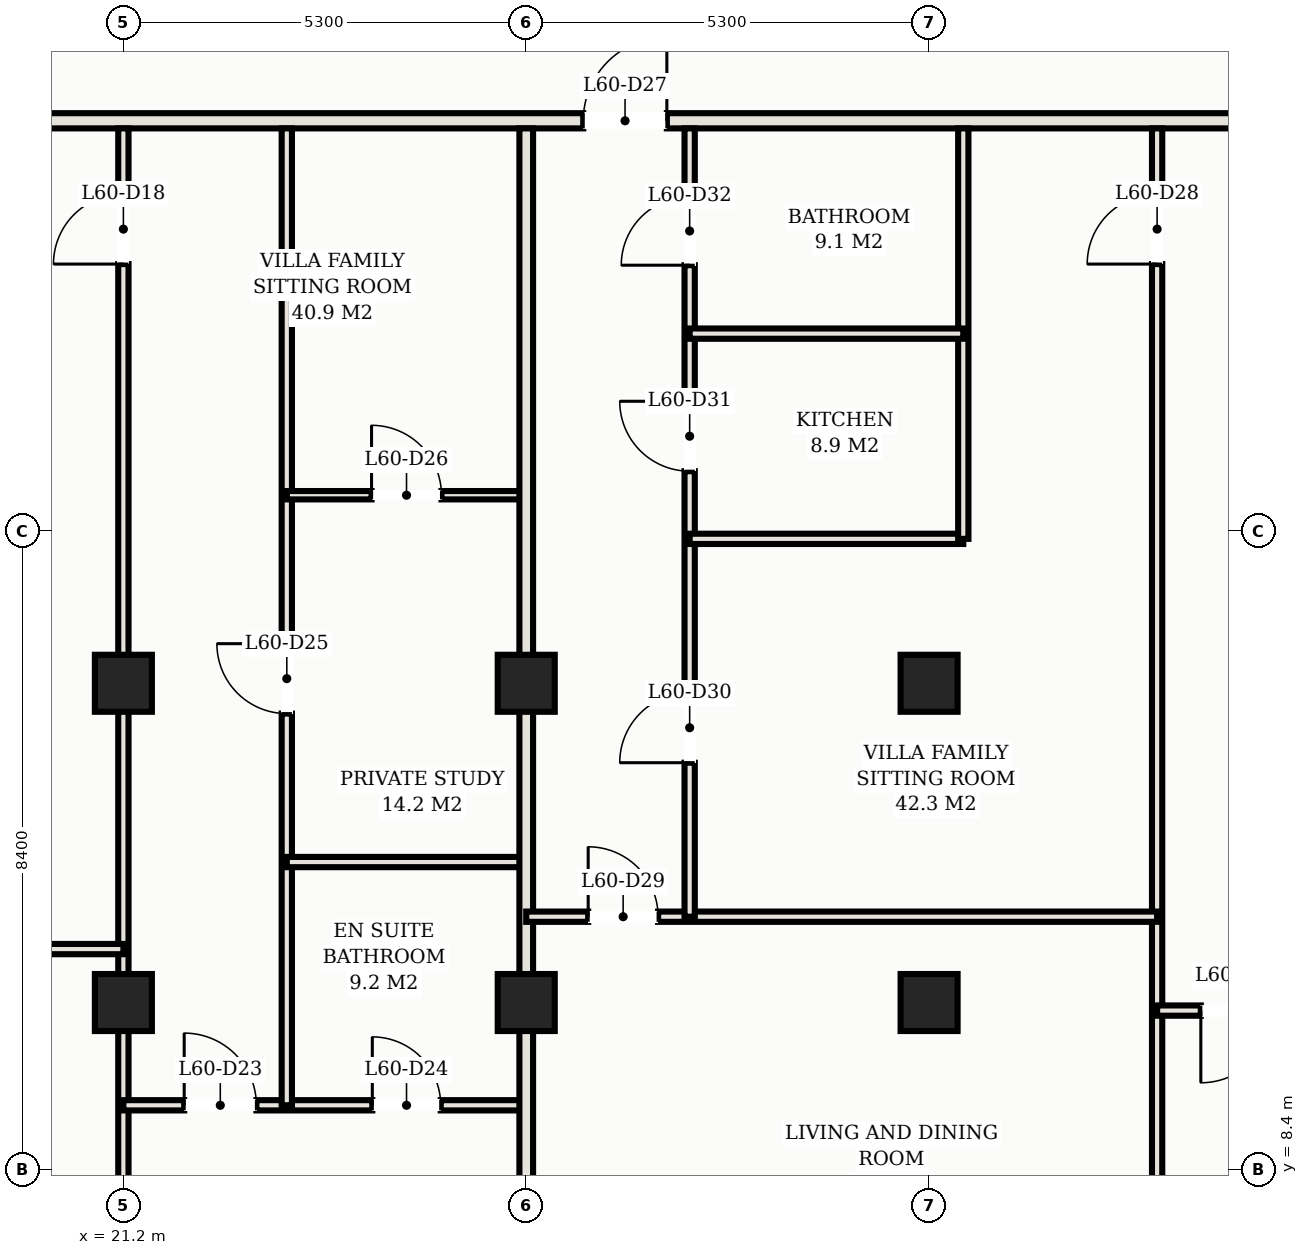
"""IFC4 building model, lengths in metres.
Left out: names, types, materials, properties, quantities, classifications, styles, units other than length and angle.
Written with IfcOpenShell. Run it as: python <this file> out.ifc"""

import sys

from ifc_helpers import new_model, si_unit, direction, frame, frame_2d, origin, origin_2d, place, context, subcontext, project, spatial, rectangle, hollow_rectangle, extrude, element, fill, save


model = new_model("IFC4")
c1 = context("Model", 3, precision=1e-05, world=origin(), true_north=direction((0.0, 1.0)))
c2 = subcontext(c1, "Body", "Model", "MODEL_VIEW")
j1 = project(units=[si_unit("LENGTHUNIT", "METRE"), si_unit("PLANEANGLEUNIT", "RADIAN")], contexts=[c1])
p1 = place(None, origin())
s1 = spatial("IfcSite", under=j1, at=p1, CompositionType="ELEMENT")
p2 = place(p1, origin())
s2 = spatial("IfcBuilding", under=s1, at=p2, CompositionType="ELEMENT")
p3 = place(p2, frame((0.0, 0.0, 219.8)))
s3 = spatial("IfcBuildingStorey", under=s2, at=p3, CompositionType="ELEMENT", Elevation=219.8)
for number, where, z_axis, x_axis in (
    (1, (21.2, 14.8, 0.0), (0.0, 0.0, 1.0), (1.0, 0.0, 0.0)),
    (2, (21.2, 10.6, 0.0), (0.0, 0.0, 1.0), (1.0, 0.0, 0.0)),
    (3, (26.5, 14.8, 0.0), (0.0, 0.0, 1.0), (1.0, 0.0, 0.0)),
    (4, (26.5, 10.6, 0.0), (0.0, 0.0, 1.0), (1.0, 0.0, 0.0)),
    (5, (31.8, 14.8, 0.0), (0.0, 0.0, 1.0), (1.0, 0.0, 0.0)),
    (6, (31.8, 10.6, 0.0), (0.0, 0.0, 1.0), (1.0, 0.0, 0.0)),
):
    element("IfcColumn", number, at=place(p3, frame(where, z_axis=z_axis, x_axis=x_axis)), inside=s3, PredefinedType="COLUMN", context=c2, shape_type="SweptSolid", body=[
        extrude(hollow_rectangle(XDim=0.75, YDim=0.75, WallThickness=0.025, at=origin_2d()), origin(), (0.0, 0.0, 1.0), 3.3),
    ])
p4 = place(p3, frame((6.72, 22.2, 0.0), z_axis=(0.0, 0.0, 1.0), x_axis=(1.0, 0.0, 0.0)))
e7 = element("IfcWall", 7, at=p4, inside=s3, PredefinedType="PARTITIONING", context=c2, shape_type="SweptSolid", body=[
    extrude(rectangle(XDim=39.56, YDim=0.2, at=frame_2d((19.78, 0.0))), origin(), (0.0, 0.0, 1.0), 2.43),
])
p5 = place(p4, frame((4.63, 0.0, 0.0)))
e8 = element("IfcOpeningElement", 8, at=p5, cuts=e7, PredefinedType="OPENING", context=c2, shape_type="SweptSolid", body=[
    extrude(rectangle(XDim=1.1, YDim=2.25, at=frame_2d((0.55, 1.125))), frame((0.0, 0.11, 0.0), z_axis=(0.0, -1.0, 0.0), x_axis=(1.0, 0.0, 0.0)), (0.0, 0.0, 1.0), 0.22),
])
p6 = place(p4, frame((20.53, 0.0, 0.0)))
e9 = element("IfcOpeningElement", 9, at=p6, cuts=e7, PredefinedType="OPENING", context=c2, shape_type="SweptSolid", body=[
    extrude(rectangle(XDim=1.1, YDim=2.25, at=frame_2d((0.55, 1.125))), frame((0.0, 0.11, 0.0), z_axis=(0.0, -1.0, 0.0), x_axis=(1.0, 0.0, 0.0)), (0.0, 0.0, 1.0), 0.22),
])
p7 = place(p4, frame((1.435, 0.0, 0.0)))
e10 = element("IfcOpeningElement", 10, at=p7, cuts=e7, PredefinedType="OPENING", context=c2, shape_type="SweptSolid", body=[
    extrude(rectangle(XDim=0.92, YDim=2.15, at=frame_2d((0.46, 1.075))), frame((0.0, 0.11, 0.0), z_axis=(0.0, -1.0, 0.0), x_axis=(1.0, 0.0, 0.0)), (0.0, 0.0, 1.0), 0.22),
])
p8 = place(p4, frame((37.205, 0.0, 0.0)))
e11 = element("IfcOpeningElement", 11, at=p8, cuts=e7, PredefinedType="OPENING", context=c2, shape_type="SweptSolid", body=[
    extrude(rectangle(XDim=0.92, YDim=2.15, at=frame_2d((0.46, 1.075))), frame((0.0, 0.11, 0.0), z_axis=(0.0, -1.0, 0.0), x_axis=(1.0, 0.0, 0.0)), (0.0, 0.0, 1.0), 0.22),
])
p9 = place(p3, frame((21.2, 5.331, 0.0), z_axis=(0.0, 0.0, 1.0), x_axis=(0.0, 1.0, 0.0)))
e12 = element("IfcWall", 12, at=p9, inside=s3, PredefinedType="PARTITIONING", context=c2, shape_type="SweptSolid", body=[
    extrude(rectangle(XDim=16.769, YDim=0.135, at=frame_2d((8.385, 0.0))), origin(), (0.0, 0.0, 1.0), 2.43),
])
p10 = place(p9, frame((14.984, 0.0, 0.0)))
e13 = element("IfcOpeningElement", 13, at=p10, cuts=e12, PredefinedType="OPENING", context=c2, shape_type="SweptSolid", body=[
    extrude(rectangle(XDim=0.92, YDim=2.15, at=frame_2d((0.46, 1.075))), frame((0.0, 0.078, 0.0), z_axis=(0.0, -1.0, 0.0), x_axis=(1.0, 0.0, 0.0)), (0.0, 0.0, 1.0), 0.155),
])
p11 = place(p3, frame((10.6, 11.303, 0.0), z_axis=(0.0, 0.0, 1.0), x_axis=(1.0, 0.0, 0.0)))
e14 = element("IfcWall", 14, at=p11, inside=s3, PredefinedType="PARTITIONING", context=c2, shape_type="SweptSolid", body=[
    extrude(rectangle(XDim=10.6, YDim=0.135, at=frame_2d((5.3, 0.0))), origin(), (0.0, 0.0, 1.0), 2.43),
])
p12 = place(p11, frame((0.815, 0.0, 0.0)))
e15 = element("IfcOpeningElement", 15, at=p12, cuts=e14, PredefinedType="OPENING", context=c2, shape_type="SweptSolid", body=[
    extrude(rectangle(XDim=0.92, YDim=2.15, at=frame_2d((0.46, 1.075))), frame((0.0, 0.078, 0.0), z_axis=(0.0, -1.0, 0.0), x_axis=(1.0, 0.0, 0.0)), (0.0, 0.0, 1.0), 0.155),
])
p13 = place(p3, frame((21.2, 9.248, 0.0), z_axis=(0.0, 0.0, 1.0), x_axis=(1.0, 0.0, 0.0)))
e16 = element("IfcWall", 16, at=p13, inside=s3, PredefinedType="PARTITIONING", context=c2, shape_type="SweptSolid", body=[
    extrude(rectangle(XDim=5.3, YDim=0.135, at=frame_2d((2.65, 0.0))), origin(), (0.0, 0.0, 1.0), 2.43),
])
p14 = place(p13, frame((0.8, 0.0, 0.0)))
e17 = element("IfcOpeningElement", 17, at=p14, cuts=e16, PredefinedType="OPENING", context=c2, shape_type="SweptSolid", body=[
    extrude(rectangle(XDim=0.95, YDim=2.15, at=frame_2d((0.475, 1.075))), frame((0.0, 0.078, 0.0), z_axis=(0.0, -1.0, 0.0), x_axis=(1.0, 0.0, 0.0)), (0.0, 0.0, 1.0), 0.155),
])
p15 = place(p13, frame((3.275, 0.0, 0.0)))
e18 = element("IfcOpeningElement", 18, at=p15, cuts=e16, PredefinedType="OPENING", context=c2, shape_type="SweptSolid", body=[
    extrude(rectangle(XDim=0.9, YDim=2.15, at=frame_2d((0.45, 1.075))), frame((0.0, 0.078, 0.0), z_axis=(0.0, -1.0, 0.0), x_axis=(1.0, 0.0, 0.0)), (0.0, 0.0, 1.0), 0.155),
])
p16 = place(p3, frame((23.35, 9.248, 0.0), z_axis=(0.0, 0.0, 1.0), x_axis=(0.0, 1.0, 0.0)))
e19 = element("IfcWall", 19, at=p16, inside=s3, PredefinedType="PARTITIONING", context=c2, shape_type="SweptSolid", body=[
    extrude(rectangle(XDim=12.852, YDim=0.135, at=frame_2d((6.426, 0.0))), origin(), (0.0, 0.0, 1.0), 2.43),
])
p17 = place(p16, frame((5.153, 0.0, 0.0)))
e20 = element("IfcOpeningElement", 20, at=p17, cuts=e19, PredefinedType="OPENING", context=c2, shape_type="SweptSolid", body=[
    extrude(rectangle(XDim=0.92, YDim=2.15, at=frame_2d((0.46, 1.075))), frame((0.0, 0.078, 0.0), z_axis=(0.0, -1.0, 0.0), x_axis=(1.0, 0.0, 0.0)), (0.0, 0.0, 1.0), 0.155),
])
p18 = place(p3, frame((23.35, 12.448, 0.0), z_axis=(0.0, 0.0, 1.0), x_axis=(1.0, 0.0, 0.0)))
e21 = element("IfcWall", 21, at=p18, inside=s3, PredefinedType="PARTITIONING", context=c2, shape_type="SweptSolid", body=[
    extrude(rectangle(XDim=3.15, YDim=0.135, at=frame_2d((1.575, 0.0))), origin(), (0.0, 0.0, 1.0), 2.43),
])
p19 = place(p3, frame((23.35, 17.274, 0.0), z_axis=(0.0, 0.0, 1.0), x_axis=(1.0, 0.0, 0.0)))
e22 = element("IfcWall", 22, at=p19, inside=s3, PredefinedType="MOVABLE", context=c2, shape_type="SweptSolid", body=[
    extrude(rectangle(XDim=3.15, YDim=0.11, at=frame_2d((1.575, 0.0))), origin(), (0.0, 0.0, 1.0), 2.43),
])
p20 = place(p19, frame((1.115, 0.0, 0.0)))
e23 = element("IfcOpeningElement", 23, at=p20, cuts=e22, PredefinedType="OPENING", context=c2, shape_type="SweptSolid", body=[
    extrude(rectangle(XDim=0.92, YDim=2.15, at=frame_2d((0.46, 1.075))), frame((0.0, 0.065, 0.0), z_axis=(0.0, -1.0, 0.0), x_axis=(1.0, 0.0, 0.0)), (0.0, 0.0, 1.0), 0.13),
])
p21 = place(p3, frame((26.5, 4.42, 0.0), z_axis=(0.0, 0.0, 1.0), x_axis=(0.0, 1.0, 0.0)))
e24 = element("IfcWall", 24, at=p21, inside=s3, PredefinedType="PARTITIONING", context=c2, shape_type="SweptSolid", body=[
    extrude(rectangle(XDim=17.68, YDim=0.18, at=frame_2d((8.84, 0.0))), origin(), (0.0, 0.0, 1.0), 2.43),
])
p22 = place(p3, frame((34.8, 6.02, 0.0), z_axis=(0.0, 0.0, 1.0), x_axis=(0.0, 1.0, 0.0)))
e25 = element("IfcWall", 25, at=p22, inside=s3, PredefinedType="PARTITIONING", context=c2, shape_type="SweptSolid", body=[
    extrude(rectangle(XDim=16.08, YDim=0.135, at=frame_2d((8.04, 0.0))), origin(), (0.0, 0.0, 1.0), 2.43),
])
p23 = place(p22, frame((14.295, 0.0, 0.0)))
e26 = element("IfcOpeningElement", 26, at=p23, cuts=e25, PredefinedType="OPENING", context=c2, shape_type="SweptSolid", body=[
    extrude(rectangle(XDim=0.92, YDim=2.15, at=frame_2d((0.46, 1.075))), frame((0.0, 0.078, 0.0), z_axis=(0.0, -1.0, 0.0), x_axis=(1.0, 0.0, 0.0)), (0.0, 0.0, 1.0), 0.155),
])
p24 = place(p3, frame((26.5, 11.729, 0.0), z_axis=(0.0, 0.0, 1.0), x_axis=(1.0, 0.0, 0.0)))
e27 = element("IfcWall", 27, at=p24, inside=s3, PredefinedType="PARTITIONING", context=c2, shape_type="SweptSolid", body=[
    extrude(rectangle(XDim=8.3, YDim=0.135, at=frame_2d((4.15, 0.0))), origin(), (0.0, 0.0, 1.0), 2.43),
])
p25 = place(p24, frame((0.815, 0.0, 0.0)))
e28 = element("IfcOpeningElement", 28, at=p25, cuts=e27, PredefinedType="OPENING", context=c2, shape_type="SweptSolid", body=[
    extrude(rectangle(XDim=0.92, YDim=2.15, at=frame_2d((0.46, 1.075))), frame((0.0, 0.078, 0.0), z_axis=(0.0, -1.0, 0.0), x_axis=(1.0, 0.0, 0.0)), (0.0, 0.0, 1.0), 0.155),
])
p26 = place(p3, frame((28.65, 11.729, 0.0), z_axis=(0.0, 0.0, 1.0), x_axis=(0.0, 1.0, 0.0)))
e29 = element("IfcWall", 29, at=p26, inside=s3, PredefinedType="PARTITIONING", context=c2, shape_type="SweptSolid", body=[
    extrude(rectangle(XDim=10.371, YDim=0.135, at=frame_2d((5.186, 0.0))), origin(), (0.0, 0.0, 1.0), 2.43),
])
p27 = place(p26, frame((2.026, 0.0, 0.0)))
e30 = element("IfcOpeningElement", 30, at=p27, cuts=e29, PredefinedType="OPENING", context=c2, shape_type="SweptSolid", body=[
    extrude(rectangle(XDim=0.92, YDim=2.15, at=frame_2d((0.46, 1.075))), frame((0.0, 0.078, 0.0), z_axis=(0.0, -1.0, 0.0), x_axis=(1.0, 0.0, 0.0)), (0.0, 0.0, 1.0), 0.155),
])
p28 = place(p26, frame((5.861, 0.0, 0.0)))
e31 = element("IfcOpeningElement", 31, at=p28, cuts=e29, PredefinedType="OPENING", context=c2, shape_type="SweptSolid", body=[
    extrude(rectangle(XDim=0.92, YDim=2.15, at=frame_2d((0.46, 1.075))), frame((0.0, 0.078, 0.0), z_axis=(0.0, -1.0, 0.0), x_axis=(1.0, 0.0, 0.0)), (0.0, 0.0, 1.0), 0.155),
])
p29 = place(p26, frame((8.571, 0.0, 0.0)))
e32 = element("IfcOpeningElement", 32, at=p29, cuts=e29, PredefinedType="OPENING", context=c2, shape_type="SweptSolid", body=[
    extrude(rectangle(XDim=0.9, YDim=2.15, at=frame_2d((0.45, 1.075))), frame((0.0, 0.078, 0.0), z_axis=(0.0, -1.0, 0.0), x_axis=(1.0, 0.0, 0.0)), (0.0, 0.0, 1.0), 0.155),
])
p30 = place(p3, frame((28.65, 16.7, 0.0), z_axis=(0.0, 0.0, 1.0), x_axis=(1.0, 0.0, 0.0)))
e33 = element("IfcWall", 33, at=p30, inside=s3, PredefinedType="PARTITIONING", context=c2, shape_type="SweptSolid", body=[
    extrude(rectangle(XDim=3.6, YDim=0.135, at=frame_2d((1.8, 0.0))), origin(), (0.0, 0.0, 1.0), 2.43),
])
p31 = place(p3, frame((32.25, 16.7, 0.0), z_axis=(0.0, 0.0, 1.0), x_axis=(0.0, 1.0, 0.0)))
e34 = element("IfcWall", 34, at=p31, inside=s3, PredefinedType="PARTITIONING", context=c2, shape_type="SweptSolid", body=[
    extrude(rectangle(XDim=5.4, YDim=0.135, at=frame_2d((2.7, 0.0))), origin(), (0.0, 0.0, 1.0), 2.43),
])
p32 = place(p3, frame((28.65, 19.4, 0.0), z_axis=(0.0, 0.0, 1.0), x_axis=(1.0, 0.0, 0.0)))
e35 = element("IfcWall", 35, at=p32, inside=s3, PredefinedType="PARTITIONING", context=c2, shape_type="SweptSolid", body=[
    extrude(rectangle(XDim=3.6, YDim=0.135, at=frame_2d((1.8, 0.0))), origin(), (0.0, 0.0, 1.0), 2.43),
])
p33 = place(p3, frame((34.8, 10.494, 0.0), z_axis=(0.0, 0.0, 1.0), x_axis=(1.0, 0.0, 0.0)))
e36 = element("IfcWall", 36, at=p33, inside=s3, PredefinedType="PARTITIONING", context=c2, shape_type="SweptSolid", body=[
    extrude(rectangle(XDim=7.6, YDim=0.135, at=frame_2d((3.8, 0.0))), origin(), (0.0, 0.0, 1.0), 2.43),
])
p34 = place(p33, frame((0.575, 0.0, 0.0)))
e37 = element("IfcOpeningElement", 37, at=p34, cuts=e36, PredefinedType="OPENING", context=c2, shape_type="SweptSolid", body=[
    extrude(rectangle(XDim=0.95, YDim=2.15, at=frame_2d((0.475, 1.075))), frame((0.0, 0.078, 0.0), z_axis=(0.0, -1.0, 0.0), x_axis=(1.0, 0.0, 0.0)), (0.0, 0.0, 1.0), 0.155),
])
p35 = place(p33, frame((4.95, 0.0, 0.0)))
e38 = element("IfcOpeningElement", 38, at=p35, cuts=e36, PredefinedType="OPENING", context=c2, shape_type="SweptSolid", body=[
    extrude(rectangle(XDim=0.9, YDim=2.15, at=frame_2d((0.45, 1.075))), frame((0.0, 0.078, 0.0), z_axis=(0.0, -1.0, 0.0), x_axis=(1.0, 0.0, 0.0)), (0.0, 0.0, 1.0), 0.155),
])
p36 = place(p10, origin())
e39 = element("IfcDoor", 39, at=p36, inside=s3, OperationType="SINGLE_SWING_LEFT", PredefinedType="DOOR", context=c2, shape_type="SweptSolid", body=[
    extrude(rectangle(XDim=0.92, YDim=2.15, at=frame_2d((0.46, 1.075))), frame((0.0, 0.025, 0.0), z_axis=(0.0, -1.0, 0.0), x_axis=(1.0, 0.0, 0.0)), (0.0, 0.0, 1.0), 0.05),
])
fill(e13, e39)
p37 = place(p14, origin())
e40 = element("IfcDoor", 40, at=p37, inside=s3, OperationType="SINGLE_SWING_LEFT", PredefinedType="DOOR", context=c2, shape_type="SweptSolid", body=[
    extrude(rectangle(XDim=0.95, YDim=2.15, at=frame_2d((0.475, 1.075))), frame((0.0, 0.025, 0.0), z_axis=(0.0, -1.0, 0.0), x_axis=(1.0, 0.0, 0.0)), (0.0, 0.0, 1.0), 0.05),
])
fill(e17, e40)
p38 = place(p15, origin())
e41 = element("IfcDoor", 41, at=p38, inside=s3, OperationType="SINGLE_SWING_LEFT", PredefinedType="DOOR", context=c2, shape_type="SweptSolid", body=[
    extrude(rectangle(XDim=0.9, YDim=2.15, at=frame_2d((0.45, 1.075))), frame((0.0, 0.025, 0.0), z_axis=(0.0, -1.0, 0.0), x_axis=(1.0, 0.0, 0.0)), (0.0, 0.0, 1.0), 0.05),
])
fill(e18, e41)
p39 = place(p17, origin())
e42 = element("IfcDoor", 42, at=p39, inside=s3, OperationType="SINGLE_SWING_RIGHT", PredefinedType="DOOR", context=c2, shape_type="SweptSolid", body=[
    extrude(rectangle(XDim=0.92, YDim=2.15, at=frame_2d((0.46, 1.075))), frame((0.0, 0.025, 0.0), z_axis=(0.0, -1.0, 0.0), x_axis=(1.0, 0.0, 0.0)), (0.0, 0.0, 1.0), 0.05),
])
fill(e20, e42)
p40 = place(p20, origin())
e43 = element("IfcDoor", 43, at=p40, inside=s3, OperationType="SINGLE_SWING_LEFT", PredefinedType="DOOR", context=c2, shape_type="SweptSolid", body=[
    extrude(rectangle(XDim=0.92, YDim=2.15, at=frame_2d((0.46, 1.075))), frame((0.0, 0.025, 0.0), z_axis=(0.0, -1.0, 0.0), x_axis=(1.0, 0.0, 0.0)), (0.0, 0.0, 1.0), 0.05),
])
fill(e23, e43)
p41 = place(p6, origin())
e44 = element("IfcDoor", 44, at=p41, inside=s3, OperationType="SINGLE_SWING_RIGHT", PredefinedType="DOOR", context=c2, shape_type="SweptSolid", body=[
    extrude(rectangle(XDim=1.1, YDim=2.25, at=frame_2d((0.55, 1.125))), frame((0.0, 0.025, 0.0), z_axis=(0.0, -1.0, 0.0), x_axis=(1.0, 0.0, 0.0)), (0.0, 0.0, 1.0), 0.05),
])
fill(e9, e44)
p42 = place(p23, origin())
e45 = element("IfcDoor", 45, at=p42, inside=s3, OperationType="SINGLE_SWING_LEFT", PredefinedType="DOOR", context=c2, shape_type="SweptSolid", body=[
    extrude(rectangle(XDim=0.92, YDim=2.15, at=frame_2d((0.46, 1.075))), frame((0.0, 0.025, 0.0), z_axis=(0.0, -1.0, 0.0), x_axis=(1.0, 0.0, 0.0)), (0.0, 0.0, 1.0), 0.05),
])
fill(e26, e45)
p43 = place(p25, origin())
e46 = element("IfcDoor", 46, at=p43, inside=s3, OperationType="SINGLE_SWING_LEFT", PredefinedType="DOOR", context=c2, shape_type="SweptSolid", body=[
    extrude(rectangle(XDim=0.92, YDim=2.15, at=frame_2d((0.46, 1.075))), frame((0.0, 0.025, 0.0), z_axis=(0.0, -1.0, 0.0), x_axis=(1.0, 0.0, 0.0)), (0.0, 0.0, 1.0), 0.05),
])
fill(e28, e46)
p44 = place(p27, origin())
e47 = element("IfcDoor", 47, at=p44, inside=s3, OperationType="SINGLE_SWING_LEFT", PredefinedType="DOOR", context=c2, shape_type="SweptSolid", body=[
    extrude(rectangle(XDim=0.92, YDim=2.15, at=frame_2d((0.46, 1.075))), frame((0.0, 0.025, 0.0), z_axis=(0.0, -1.0, 0.0), x_axis=(1.0, 0.0, 0.0)), (0.0, 0.0, 1.0), 0.05),
])
fill(e30, e47)
p45 = place(p28, origin())
e48 = element("IfcDoor", 48, at=p45, inside=s3, OperationType="SINGLE_SWING_RIGHT", PredefinedType="DOOR", context=c2, shape_type="SweptSolid", body=[
    extrude(rectangle(XDim=0.92, YDim=2.15, at=frame_2d((0.46, 1.075))), frame((0.0, 0.025, 0.0), z_axis=(0.0, -1.0, 0.0), x_axis=(1.0, 0.0, 0.0)), (0.0, 0.0, 1.0), 0.05),
])
fill(e31, e48)
p46 = place(p29, origin())
e49 = element("IfcDoor", 49, at=p46, inside=s3, OperationType="SINGLE_SWING_LEFT", PredefinedType="DOOR", context=c2, shape_type="SweptSolid", body=[
    extrude(rectangle(XDim=0.9, YDim=2.15, at=frame_2d((0.45, 1.075))), frame((0.0, 0.025, 0.0), z_axis=(0.0, -1.0, 0.0), x_axis=(1.0, 0.0, 0.0)), (0.0, 0.0, 1.0), 0.05),
])
fill(e32, e49)
p47 = place(p34, frame((0.95, 0.0, 0.0), z_axis=(0.0, 0.0, 1.0), x_axis=(-1.0, 0.0, 0.0)))
e50 = element("IfcDoor", 50, at=p47, inside=s3, OperationType="SINGLE_SWING_RIGHT", PredefinedType="DOOR", context=c2, shape_type="SweptSolid", body=[
    extrude(rectangle(XDim=0.95, YDim=2.15, at=frame_2d((0.475, 1.075))), frame((0.0, 0.025, 0.0), z_axis=(0.0, -1.0, 0.0), x_axis=(1.0, 0.0, 0.0)), (0.0, 0.0, 1.0), 0.05),
])
fill(e37, e50)
save(model, sys.argv[1])
